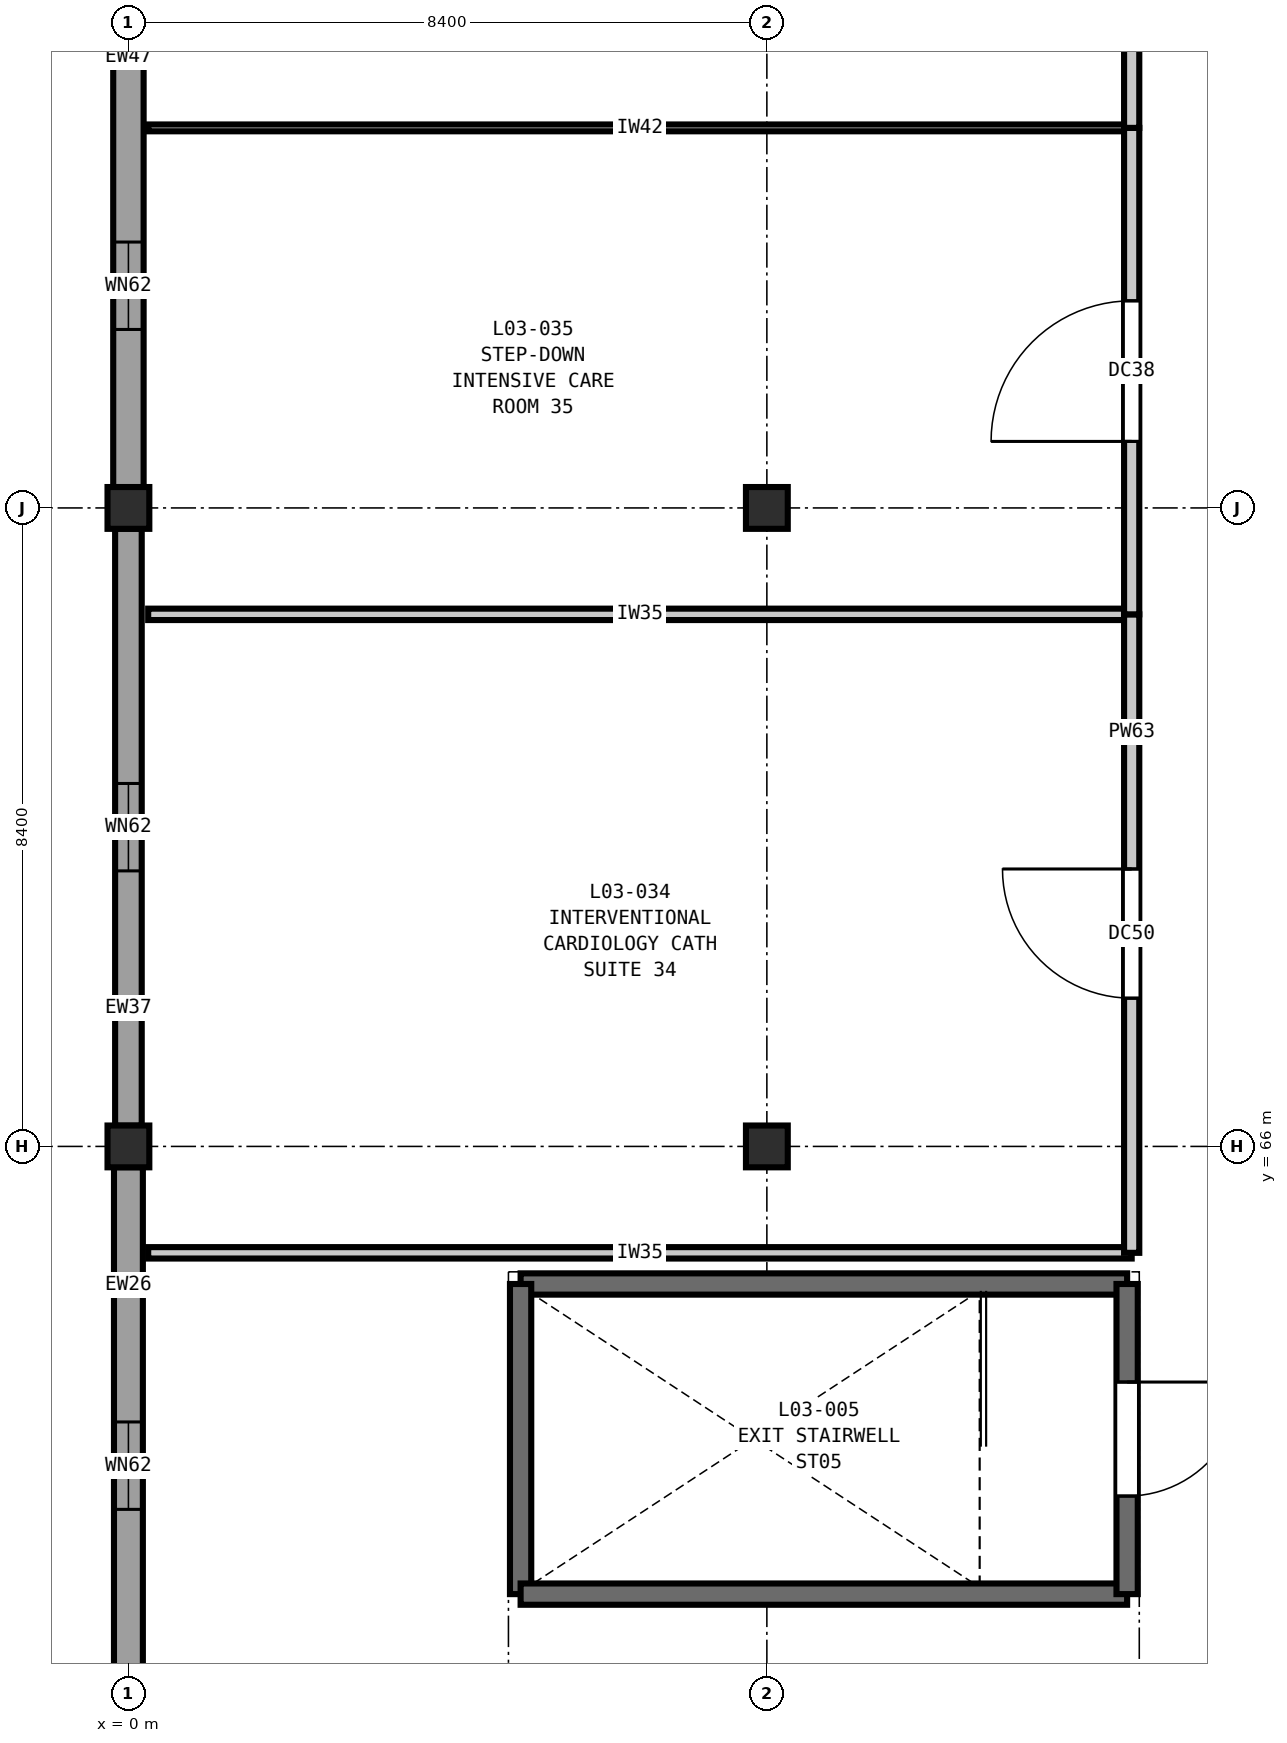
"""IFC4 building model, lengths in metres.
Left out: names, types, materials, properties, quantities, classifications, styles, units other than length and angle.
Written with IfcOpenShell. Run it as: python <this file> out.ifc"""

import sys

from ifc_helpers import new_model, si_unit, direction, frame, frame_2d, origin, origin_2d, place, context, subcontext, project, spatial, rectangle, extrude, element, fill, save


model = new_model("IFC4")
c1 = context("Model", 3, precision=1e-05, world=origin(), true_north=direction((0.0, 1.0)))
c2 = subcontext(c1, "Body", "Model", "MODEL_VIEW")
j1 = project(units=[si_unit("LENGTHUNIT", "METRE"), si_unit("PLANEANGLEUNIT", "RADIAN")], contexts=[c1])
p1 = place(None, origin())
s1 = spatial("IfcSite", under=j1, at=p1, CompositionType="ELEMENT")
p2 = place(p1, origin())
s2 = spatial("IfcBuilding", under=s1, at=p2, CompositionType="ELEMENT")
p3 = place(p2, frame((0.0, 0.0, 16.2)))
s3 = spatial("IfcBuildingStorey", under=s2, at=p3, CompositionType="ELEMENT", Elevation=16.2)
for number, where, z_axis, x_axis in (
    (1, (0.0, 66.0, 0.0), (0.0, 0.0, 1.0), (1.0, 0.0, 0.0)),
    (2, (0.0, 74.4, 0.0), (0.0, 0.0, 1.0), (1.0, 0.0, 0.0)),
    (3, (8.4, 66.0, 0.0), (0.0, 0.0, 1.0), (1.0, 0.0, 0.0)),
    (4, (8.4, 74.4, 0.0), (0.0, 0.0, 1.0), (1.0, 0.0, 0.0)),
):
    element("IfcColumn", number, at=place(p3, frame(where, z_axis=z_axis, x_axis=x_axis)), inside=s3, PredefinedType="COLUMN", context=c2, shape_type="SweptSolid", body=[
        extrude(rectangle(XDim=0.55, YDim=0.55, at=origin_2d()), origin(), (0.0, 0.0, 1.0), 4.2),
    ])
p4 = place(p3, frame((0.0, 57.873, 0.0), z_axis=(0.0, 0.0, 1.0), x_axis=(0.0, 1.0, 0.0)))
e5 = element("IfcWall", 5, at=p4, inside=s3, PredefinedType="SOLIDWALL", context=c2, shape_type="SweptSolid", body=[
    extrude(rectangle(XDim=7.854, YDim=0.38, at=frame_2d((3.927, 0.0))), origin(), (0.0, 0.0, 1.0), 3.48),
])
p5 = place(p4, frame((3.352, 0.0, 0.9)))
e6 = element("IfcOpeningElement", 6, at=p5, cuts=e5, PredefinedType="OPENING", context=c2, shape_type="SweptSolid", body=[
    extrude(rectangle(XDim=1.15, YDim=1.4, at=frame_2d((0.575, 0.7))), frame((0.0, 0.2, 0.0), z_axis=(0.0, -1.0, 0.0), x_axis=(1.0, 0.0, 0.0)), (0.0, 0.0, 1.0), 0.4),
])
p6 = place(p3, frame((0.0, 66.273, 0.0), z_axis=(0.0, 0.0, 1.0), x_axis=(0.0, 1.0, 0.0)))
e7 = element("IfcWall", 7, at=p6, inside=s3, PredefinedType="SOLIDWALL", context=c2, shape_type="SweptSolid", body=[
    extrude(rectangle(XDim=7.854, YDim=0.35, at=frame_2d((3.927, 0.0))), origin(), (0.0, 0.0, 1.0), 3.48),
])
p7 = place(p6, frame((3.352, 0.0, 0.9)))
e8 = element("IfcOpeningElement", 8, at=p7, cuts=e7, PredefinedType="OPENING", context=c2, shape_type="SweptSolid", body=[
    extrude(rectangle(XDim=1.15, YDim=1.4, at=frame_2d((0.575, 0.7))), frame((0.0, 0.185, 0.0), z_axis=(0.0, -1.0, 0.0), x_axis=(1.0, 0.0, 0.0)), (0.0, 0.0, 1.0), 0.37),
])
p8 = place(p3, frame((0.0, 74.673, 0.0), z_axis=(0.0, 0.0, 1.0), x_axis=(0.0, 1.0, 0.0)))
e9 = element("IfcWall", 9, at=p8, inside=s3, PredefinedType="SOLIDWALL", context=c2, shape_type="SweptSolid", body=[
    extrude(rectangle(XDim=7.854, YDim=0.4, at=frame_2d((3.927, 0.0))), origin(), (0.0, 0.0, 1.0), 3.48),
])
p9 = place(p8, frame((2.075, 0.0, 0.9)))
e10 = element("IfcOpeningElement", 10, at=p9, cuts=e9, PredefinedType="OPENING", context=c2, shape_type="SweptSolid", body=[
    extrude(rectangle(XDim=1.15, YDim=1.4, at=frame_2d((0.575, 0.7))), frame((0.0, 0.21, 0.0), z_axis=(0.0, -1.0, 0.0), x_axis=(1.0, 0.0, 0.0)), (0.0, 0.0, 1.0), 0.42),
])
p10 = place(p3, frame((13.14, 64.19, 0.0), z_axis=(0.0, 0.0, 1.0), x_axis=(-1.0, 0.0, 0.0)))
e11 = element("IfcWall", 11, at=p10, inside=s3, PredefinedType="SHEAR", context=c2, shape_type="SweptSolid", body=[
    extrude(rectangle(XDim=7.98, YDim=0.28, at=frame_2d((3.99, 0.0))), origin(), (0.0, 0.0, 1.0), 4.2),
])
p11 = place(p3, frame((5.16, 64.19, 0.0), z_axis=(0.0, 0.0, 1.0), x_axis=(0.0, -1.0, 0.0)))
e12 = element("IfcWall", 12, at=p11, inside=s3, PredefinedType="SHEAR", context=c2, shape_type="SweptSolid", body=[
    extrude(rectangle(XDim=4.08, YDim=0.28, at=frame_2d((2.04, 0.0))), origin(), (0.0, 0.0, 1.0), 4.2),
])
p12 = place(p3, frame((5.16, 60.11, 0.0), z_axis=(0.0, 0.0, 1.0), x_axis=(1.0, 0.0, 0.0)))
e13 = element("IfcWall", 13, at=p12, inside=s3, PredefinedType="SHEAR", context=c2, shape_type="SweptSolid", body=[
    extrude(rectangle(XDim=7.98, YDim=0.28, at=frame_2d((3.99, 0.0))), origin(), (0.0, 0.0, 1.0), 4.2),
])
p13 = place(p3, frame((13.14, 60.11, 0.0), z_axis=(0.0, 0.0, 1.0), x_axis=(0.0, 1.0, 0.0)))
e14 = element("IfcWall", 14, at=p13, inside=s3, PredefinedType="SHEAR", context=c2, shape_type="SweptSolid", body=[
    extrude(rectangle(XDim=4.08, YDim=0.28, at=frame_2d((2.04, 0.0))), origin(), (0.0, 0.0, 1.0), 4.2),
])
p14 = place(p13, frame((1.29, 0.0, 0.0)))
e15 = element("IfcOpeningElement", 15, at=p14, cuts=e14, PredefinedType="OPENING", context=c2, shape_type="SweptSolid", body=[
    extrude(rectangle(XDim=1.5, YDim=2.2, at=frame_2d((0.75, 1.1))), frame((0.0, 0.15, 0.0), z_axis=(0.0, -1.0, 0.0), x_axis=(1.0, 0.0, 0.0)), (0.0, 0.0, 1.0), 0.3),
])
for number, where, z_axis, x_axis in (
    (16, (0.26, 64.6, 0.0), (0.0, 0.0, 1.0), (1.0, 0.0, 0.0)),
    (17, (0.26, 73.0, 0.0), (0.0, 0.0, 1.0), (1.0, 0.0, 0.0)),
):
    element("IfcWall", number, at=place(p3, frame(where, z_axis=z_axis, x_axis=x_axis)), inside=s3, PredefinedType="PARTITIONING", context=c2, shape_type="SweptSolid", body=[
        extrude(rectangle(XDim=12.94, YDim=0.15, at=frame_2d((6.47, 0.0))), origin(), (0.0, 0.0, 1.0), 3.89),
    ])
p15 = place(p3, frame((0.26, 79.4, 0.0), z_axis=(0.0, 0.0, 1.0), x_axis=(1.0, 0.0, 0.0)))
e18 = element("IfcWall", 18, at=p15, inside=s3, PredefinedType="PARTITIONING", context=c2, shape_type="SweptSolid", body=[
    extrude(rectangle(XDim=12.94, YDim=0.09, at=frame_2d((6.47, 0.0))), origin(), (0.0, 0.0, 1.0), 3.89),
])
p16 = place(p3, frame((13.2, 64.6, 0.0), z_axis=(0.0, 0.0, 1.0), x_axis=(0.0, 1.0, 0.0)))
e19 = element("IfcWall", 19, at=p16, inside=s3, PredefinedType="PARTITIONING", context=c2, shape_type="SweptSolid", body=[
    extrude(rectangle(XDim=8.4, YDim=0.2, at=frame_2d((4.2, 0.0))), origin(), (0.0, 0.0, 1.0), 3.89),
])
p17 = place(p16, frame((3.35, 0.0, 0.0)))
e20 = element("IfcOpeningElement", 20, at=p17, cuts=e19, PredefinedType="OPENING", context=c2, shape_type="SweptSolid", body=[
    extrude(rectangle(XDim=1.7, YDim=2.3, at=frame_2d((0.85, 1.15))), frame((0.0, 0.11, 0.0), z_axis=(0.0, -1.0, 0.0), x_axis=(1.0, 0.0, 0.0)), (0.0, 0.0, 1.0), 0.22),
])
p18 = place(p3, frame((13.2, 73.0, 0.0), z_axis=(0.0, 0.0, 1.0), x_axis=(0.0, 1.0, 0.0)))
e21 = element("IfcWall", 21, at=p18, inside=s3, PredefinedType="PARTITIONING", context=c2, shape_type="SweptSolid", body=[
    extrude(rectangle(XDim=6.4, YDim=0.2, at=frame_2d((3.2, 0.0))), origin(), (0.0, 0.0, 1.0), 3.89),
])
p19 = place(p18, frame((2.275, 0.0, 0.0)))
e22 = element("IfcOpeningElement", 22, at=p19, cuts=e21, PredefinedType="OPENING", context=c2, shape_type="SweptSolid", body=[
    extrude(rectangle(XDim=1.85, YDim=2.3, at=frame_2d((0.925, 1.15))), frame((0.0, 0.11, 0.0), z_axis=(0.0, -1.0, 0.0), x_axis=(1.0, 0.0, 0.0)), (0.0, 0.0, 1.0), 0.22),
])
p20 = place(p3, frame((13.2, 79.4, 0.0), z_axis=(0.0, 0.0, 1.0), x_axis=(0.0, 1.0, 0.0)))
e23 = element("IfcWall", 23, at=p20, inside=s3, PredefinedType="PARTITIONING", context=c2, shape_type="SweptSolid", body=[
    extrude(rectangle(XDim=3.4, YDim=0.2, at=frame_2d((1.7, 0.0))), origin(), (0.0, 0.0, 1.0), 3.89),
])
p21 = place(p20, frame((1.075, 0.0, 0.0)))
e24 = element("IfcOpeningElement", 24, at=p21, cuts=e23, PredefinedType="OPENING", context=c2, shape_type="SweptSolid", body=[
    extrude(rectangle(XDim=1.25, YDim=2.15, at=frame_2d((0.625, 1.075))), frame((0.0, 0.11, 0.0), z_axis=(0.0, -1.0, 0.0), x_axis=(1.0, 0.0, 0.0)), (0.0, 0.0, 1.0), 0.22),
])
p22 = place(p5, origin())
e25 = element("IfcWindow", 25, at=p22, inside=s3, PartitioningType="SINGLE_PANEL", PredefinedType="WINDOW", context=c2, shape_type="SweptSolid", body=[
    extrude(rectangle(XDim=1.15, YDim=1.4, at=frame_2d((0.575, 0.7))), frame((0.0, 0.03, 0.0), z_axis=(0.0, -1.0, 0.0), x_axis=(1.0, 0.0, 0.0)), (0.0, 0.0, 1.0), 0.06),
])
fill(e6, e25)
p23 = place(p7, origin())
e26 = element("IfcWindow", 26, at=p23, inside=s3, PartitioningType="SINGLE_PANEL", PredefinedType="WINDOW", context=c2, shape_type="SweptSolid", body=[
    extrude(rectangle(XDim=1.15, YDim=1.4, at=frame_2d((0.575, 0.7))), frame((0.0, 0.03, 0.0), z_axis=(0.0, -1.0, 0.0), x_axis=(1.0, 0.0, 0.0)), (0.0, 0.0, 1.0), 0.06),
])
fill(e8, e26)
p24 = place(p9, origin())
e27 = element("IfcWindow", 27, at=p24, inside=s3, PartitioningType="SINGLE_PANEL", PredefinedType="WINDOW", context=c2, shape_type="SweptSolid", body=[
    extrude(rectangle(XDim=1.15, YDim=1.4, at=frame_2d((0.575, 0.7))), frame((0.0, 0.03, 0.0), z_axis=(0.0, -1.0, 0.0), x_axis=(1.0, 0.0, 0.0)), (0.0, 0.0, 1.0), 0.06),
])
fill(e10, e27)
p25 = place(p14, frame((1.5, 0.0, 0.0), z_axis=(0.0, 0.0, 1.0), x_axis=(-1.0, 0.0, 0.0)))
e28 = element("IfcDoor", 28, at=p25, inside=s3, OperationType="SINGLE_SWING_LEFT", PredefinedType="DOOR", context=c2, shape_type="SweptSolid", body=[
    extrude(rectangle(XDim=1.5, YDim=2.2, at=frame_2d((0.75, 1.1))), frame((0.0, 0.025, 0.0), z_axis=(0.0, -1.0, 0.0), x_axis=(1.0, 0.0, 0.0)), (0.0, 0.0, 1.0), 0.05),
])
fill(e15, e28)
p26 = place(p17, origin())
e29 = element("IfcDoor", 29, at=p26, inside=s3, OperationType="SINGLE_SWING_RIGHT", PredefinedType="DOOR", context=c2, shape_type="SweptSolid", body=[
    extrude(rectangle(XDim=1.7, YDim=2.3, at=frame_2d((0.85, 1.15))), frame((0.0, 0.025, 0.0), z_axis=(0.0, -1.0, 0.0), x_axis=(1.0, 0.0, 0.0)), (0.0, 0.0, 1.0), 0.05),
])
fill(e20, e29)
p27 = place(p19, origin())
e30 = element("IfcDoor", 30, at=p27, inside=s3, OperationType="SINGLE_SWING_LEFT", PredefinedType="DOOR", context=c2, shape_type="SweptSolid", body=[
    extrude(rectangle(XDim=1.85, YDim=2.3, at=frame_2d((0.925, 1.15))), frame((0.0, 0.025, 0.0), z_axis=(0.0, -1.0, 0.0), x_axis=(1.0, 0.0, 0.0)), (0.0, 0.0, 1.0), 0.05),
])
fill(e22, e30)
save(model, sys.argv[1])
